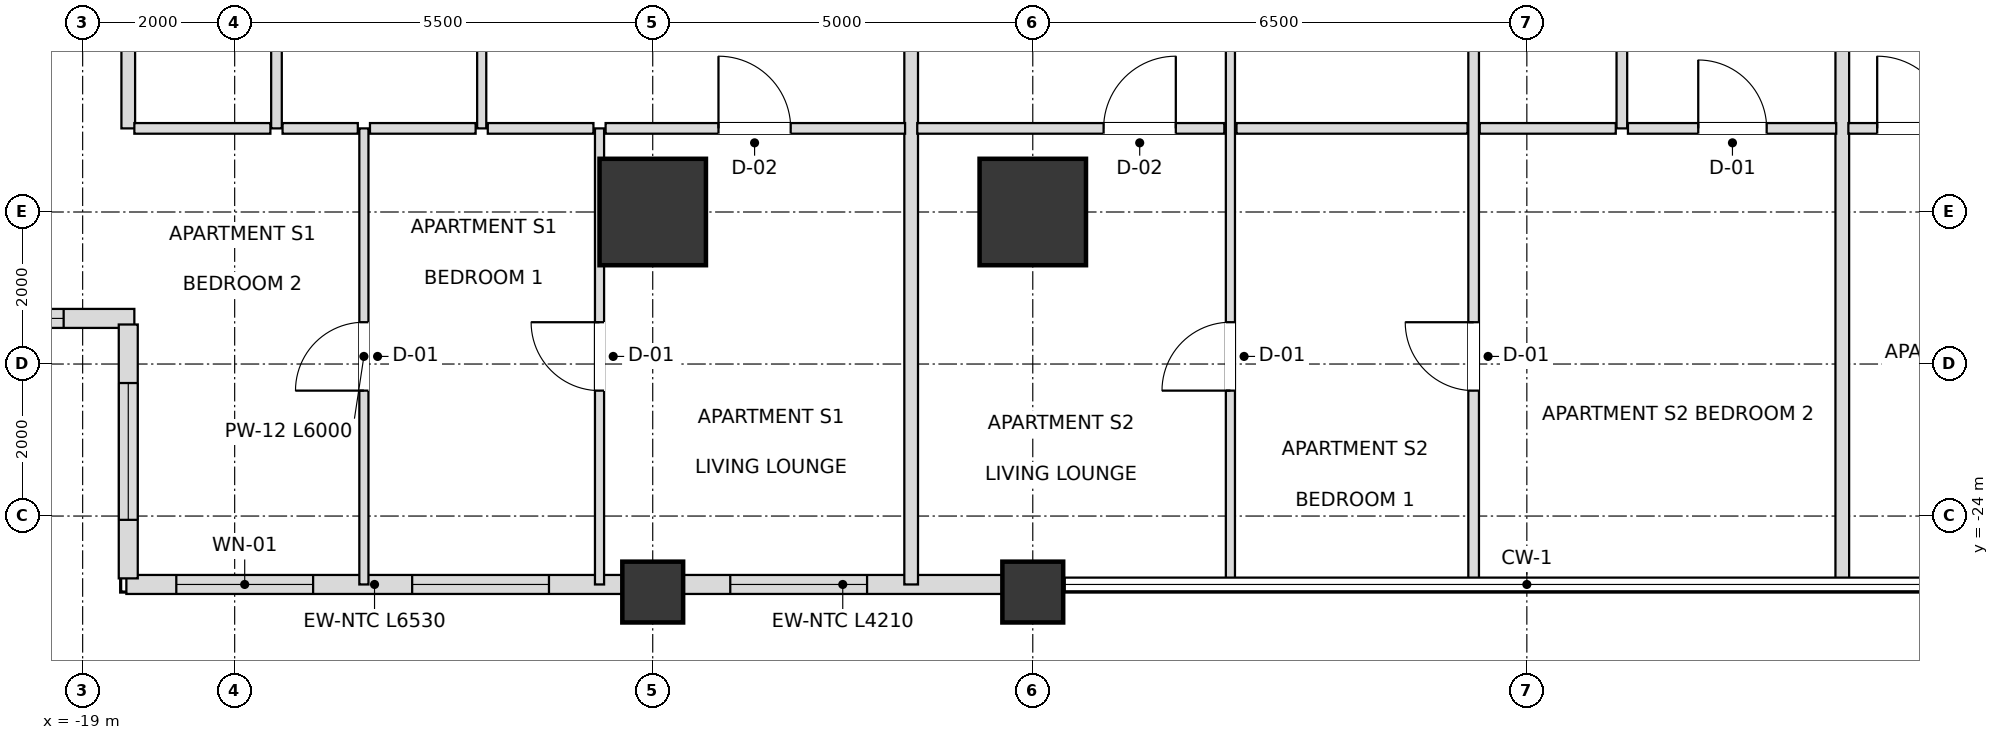
"""IFC4 building model, lengths in metres.
Left out: names, types, materials, properties, quantities, classifications, styles, units other than length and angle.
Written with IfcOpenShell. Run it as: python <this file> out.ifc"""

import sys

from ifc_helpers import new_model, si_unit, direction, frame, frame_2d, origin, origin_2d, place, context, subcontext, project, spatial, rectangle, extrude, element, fill, save


model = new_model("IFC4")
c1 = context("Model", 3, precision=1e-05, world=origin(), true_north=direction((0.0, 1.0)))
c2 = subcontext(c1, "Body", "Model", "MODEL_VIEW")
j1 = project(units=[si_unit("LENGTHUNIT", "METRE"), si_unit("PLANEANGLEUNIT", "RADIAN")], contexts=[c1])
p1 = place(None, origin())
s1 = spatial("IfcSite", under=j1, at=p1, CompositionType="ELEMENT")
p2 = place(p1, origin())
s2 = spatial("IfcBuilding", under=s1, at=p2, CompositionType="ELEMENT")
p3 = place(p2, frame((0.0, 0.0, 90.0)))
s3 = spatial("IfcBuildingStorey", under=s2, at=p3, CompositionType="ELEMENT", Elevation=90.0)
for number, where, z_axis, x_axis in (
    (1, (-11.5, -20.0, 0.0), (0.0, 0.0, 1.0), (1.0, 0.0, 0.0)),
    (2, (-6.5, -20.0, 0.0), (0.0, 0.0, 1.0), (1.0, 0.0, 0.0)),
):
    element("IfcColumn", number, at=place(p3, frame(where, z_axis=z_axis, x_axis=x_axis)), inside=s3, PredefinedType="USERDEFINED", context=c2, shape_type="SweptSolid", body=[
        extrude(rectangle(XDim=1.4, YDim=1.4, at=origin_2d()), origin(), (0.0, 0.0, 1.0), 3.6),
    ])
for number, where, z_axis, x_axis in (
    (3, (-11.5, -25.0, 0.0), (0.0, 0.0, 1.0), (1.0, 0.0, 0.0)),
    (4, (-6.5, -25.0, 0.0), (0.0, 0.0, 1.0), (1.0, 0.0, 0.0)),
):
    element("IfcColumn", number, at=place(p3, frame(where, z_axis=z_axis, x_axis=x_axis)), inside=s3, PredefinedType="COLUMN", context=c2, shape_type="SweptSolid", body=[
        extrude(rectangle(XDim=0.8, YDim=0.8, at=origin_2d()), origin(), (0.0, 0.0, 1.0), 3.6),
    ])
p4 = place(p3, frame((-18.425, -24.9, 0.0), z_axis=(0.0, 0.0, 1.0), x_axis=(1.0, 0.0, 0.0)))
e5 = element("IfcWall", 5, at=p4, inside=s3, PredefinedType="SOLIDWALL", context=c2, shape_type="SweptSolid", body=[
    extrude(rectangle(XDim=6.53, YDim=0.25, at=frame_2d((3.265, 0.0))), origin(), (0.0, 0.0, 1.0), 2.59),
])
p5 = place(p4, frame((0.657, 0.0, 0.72)))
e6 = element("IfcOpeningElement", 6, at=p5, cuts=e5, PredefinedType="OPENING", context=c2, shape_type="SweptSolid", body=[
    extrude(rectangle(XDim=1.8, YDim=1.68, at=frame_2d((0.9, 0.84))), frame((0.0, 0.135, 0.0), z_axis=(0.0, -1.0, 0.0), x_axis=(1.0, 0.0, 0.0)), (0.0, 0.0, 1.0), 0.27),
])
p6 = place(p4, frame((3.76, 0.0, 0.72)))
e7 = element("IfcOpeningElement", 7, at=p6, cuts=e5, PredefinedType="OPENING", context=c2, shape_type="SweptSolid", body=[
    extrude(rectangle(XDim=1.8, YDim=1.68, at=frame_2d((0.9, 0.84))), frame((0.0, 0.135, 0.0), z_axis=(0.0, -1.0, 0.0), x_axis=(1.0, 0.0, 0.0)), (0.0, 0.0, 1.0), 0.27),
])
p7 = place(p3, frame((-11.105, -24.9, 0.0), z_axis=(0.0, 0.0, 1.0), x_axis=(1.0, 0.0, 0.0)))
e8 = element("IfcWall", 8, at=p7, inside=s3, PredefinedType="SOLIDWALL", context=c2, shape_type="SweptSolid", body=[
    extrude(rectangle(XDim=4.21, YDim=0.25, at=frame_2d((2.105, 0.0))), origin(), (0.0, 0.0, 1.0), 2.59),
])
p8 = place(p7, frame((0.625, 0.0, 0.72)))
e9 = element("IfcOpeningElement", 9, at=p8, cuts=e8, PredefinedType="OPENING", context=c2, shape_type="SweptSolid", body=[
    extrude(rectangle(XDim=1.8, YDim=1.68, at=frame_2d((0.9, 0.84))), frame((0.0, 0.135, 0.0), z_axis=(0.0, -1.0, 0.0), x_axis=(1.0, 0.0, 0.0)), (0.0, 0.0, 1.0), 0.27),
])
p9 = place(p3, frame((-21.98, -21.4, 0.0), z_axis=(0.0, 0.0, 1.0), x_axis=(1.0, 0.0, 0.0)))
e10 = element("IfcWall", 10, at=p9, inside=s3, PredefinedType="SOLIDWALL", context=c2, shape_type="SweptSolid", body=[
    extrude(rectangle(XDim=3.66, YDim=0.25, at=frame_2d((1.83, 0.0))), origin(), (0.0, 0.0, 1.0), 2.59),
])
p10 = place(p9, frame((0.93, 0.0, 0.72)))
e11 = element("IfcOpeningElement", 11, at=p10, cuts=e10, PredefinedType="OPENING", context=c2, shape_type="SweptSolid", body=[
    extrude(rectangle(XDim=1.8, YDim=1.68, at=frame_2d((0.9, 0.84))), frame((0.0, 0.135, 0.0), z_axis=(0.0, -1.0, 0.0), x_axis=(1.0, 0.0, 0.0)), (0.0, 0.0, 1.0), 0.27),
])
p11 = place(p3, frame((-18.4, -21.48, 0.0), z_axis=(0.0, 0.0, 1.0), x_axis=(0.0, -1.0, 0.0)))
e12 = element("IfcWall", 12, at=p11, inside=s3, PredefinedType="SOLIDWALL", context=c2, shape_type="SweptSolid", body=[
    extrude(rectangle(XDim=3.34, YDim=0.25, at=frame_2d((1.67, 0.0))), origin(), (0.0, 0.0, 1.0), 2.59),
])
p12 = place(p11, frame((0.77, 0.0, 0.72)))
e13 = element("IfcOpeningElement", 13, at=p12, cuts=e12, PredefinedType="OPENING", context=c2, shape_type="SweptSolid", body=[
    extrude(rectangle(XDim=1.8, YDim=1.68, at=frame_2d((0.9, 0.84))), frame((0.0, 0.135, 0.0), z_axis=(0.0, -1.0, 0.0), x_axis=(1.0, 0.0, 0.0)), (0.0, 0.0, 1.0), 0.27),
])
p13 = place(p3, frame((-18.4, -18.9, 0.0), z_axis=(0.0, 0.0, 1.0), x_axis=(0.0, 1.0, 0.0)))
e14 = element("IfcWall", 14, at=p13, inside=s3, PredefinedType="PARTITIONING", context=c2, shape_type="SweptSolid", body=[
    extrude(rectangle(XDim=9.6, YDim=0.18, at=frame_2d((4.8, 0.0))), origin(), (0.0, 0.0, 1.0), 2.59),
])
p14 = place(p3, frame((-16.45, -18.9, 0.0), z_axis=(0.0, 0.0, 1.0), x_axis=(0.0, 1.0, 0.0)))
e15 = element("IfcWall", 15, at=p14, inside=s3, PredefinedType="PARTITIONING", context=c2, shape_type="SweptSolid", body=[
    extrude(rectangle(XDim=9.6, YDim=0.14, at=frame_2d((4.8, 0.0))), origin(), (0.0, 0.0, 1.0), 2.59),
])
p15 = place(p14, frame((4.222, 0.0, 0.0)))
e16 = element("IfcOpeningElement", 16, at=p15, cuts=e15, PredefinedType="OPENING", context=c2, shape_type="SweptSolid", body=[
    extrude(rectangle(XDim=0.9, YDim=2.1, at=frame_2d((0.45, 1.05))), frame((0.0, 0.08, 0.0), z_axis=(0.0, -1.0, 0.0), x_axis=(1.0, 0.0, 0.0)), (0.0, 0.0, 1.0), 0.16),
])
p16 = place(p3, frame((-15.3, -24.9, 0.0), z_axis=(0.0, 0.0, 1.0), x_axis=(0.0, 1.0, 0.0)))
e17 = element("IfcWall", 17, at=p16, inside=s3, PredefinedType="PARTITIONING", context=c2, shape_type="SweptSolid", body=[
    extrude(rectangle(XDim=6.0, YDim=0.12, at=frame_2d((3.0, 0.0))), origin(), (0.0, 0.0, 1.0), 2.59),
])
p17 = place(p16, frame((2.55, 0.0, 0.0)))
e18 = element("IfcOpeningElement", 18, at=p17, cuts=e17, PredefinedType="OPENING", context=c2, shape_type="SweptSolid", body=[
    extrude(rectangle(XDim=0.9, YDim=2.1, at=frame_2d((0.45, 1.05))), frame((0.0, 0.07, 0.0), z_axis=(0.0, -1.0, 0.0), x_axis=(1.0, 0.0, 0.0)), (0.0, 0.0, 1.0), 0.14),
])
p18 = place(p3, frame((-13.75, -18.9, 0.0), z_axis=(0.0, 0.0, 1.0), x_axis=(0.0, 1.0, 0.0)))
e19 = element("IfcWall", 19, at=p18, inside=s3, PredefinedType="PARTITIONING", context=c2, shape_type="SweptSolid", body=[
    extrude(rectangle(XDim=9.6, YDim=0.12, at=frame_2d((4.8, 0.0))), origin(), (0.0, 0.0, 1.0), 2.59),
])
p19 = place(p18, frame((4.325, 0.0, 0.0)))
e20 = element("IfcOpeningElement", 20, at=p19, cuts=e19, PredefinedType="OPENING", context=c2, shape_type="SweptSolid", body=[
    extrude(rectangle(XDim=0.95, YDim=2.1, at=frame_2d((0.475, 1.05))), frame((0.0, 0.07, 0.0), z_axis=(0.0, -1.0, 0.0), x_axis=(1.0, 0.0, 0.0)), (0.0, 0.0, 1.0), 0.14),
])
p20 = place(p3, frame((-12.2, -24.9, 0.0), z_axis=(0.0, 0.0, 1.0), x_axis=(0.0, 1.0, 0.0)))
e21 = element("IfcWall", 21, at=p20, inside=s3, PredefinedType="PARTITIONING", context=c2, shape_type="SweptSolid", body=[
    extrude(rectangle(XDim=6.0, YDim=0.12, at=frame_2d((3.0, 0.0))), origin(), (0.0, 0.0, 1.0), 2.59),
])
p21 = place(p20, frame((2.55, 0.0, 0.0)))
e22 = element("IfcOpeningElement", 22, at=p21, cuts=e21, PredefinedType="OPENING", context=c2, shape_type="SweptSolid", body=[
    extrude(rectangle(XDim=0.9, YDim=2.1, at=frame_2d((0.45, 1.05))), frame((0.0, 0.07, 0.0), z_axis=(0.0, -1.0, 0.0), x_axis=(1.0, 0.0, 0.0)), (0.0, 0.0, 1.0), 0.14),
])
p22 = place(p3, frame((-8.1, -24.9, 0.0), z_axis=(0.0, 0.0, 1.0), x_axis=(0.0, 1.0, 0.0)))
e23 = element("IfcWall", 23, at=p22, inside=s3, PredefinedType="PARTITIONING", context=c2, shape_type="SweptSolid", body=[
    extrude(rectangle(XDim=15.6, YDim=0.18, at=frame_2d((7.8, 0.0))), origin(), (0.0, 0.0, 1.0), 2.736),
])
p23 = place(p3, frame((-3.9, -24.9, 0.0), z_axis=(0.0, 0.0, 1.0), x_axis=(0.0, 1.0, 0.0)))
e24 = element("IfcWall", 24, at=p23, inside=s3, PredefinedType="PARTITIONING", context=c2, shape_type="SweptSolid", body=[
    extrude(rectangle(XDim=15.6, YDim=0.12, at=frame_2d((7.8, 0.0))), origin(), (0.0, 0.0, 1.0), 2.736),
])
p24 = place(p23, frame((10.325, 0.0, 0.0)))
e25 = element("IfcOpeningElement", 25, at=p24, cuts=e24, PredefinedType="OPENING", context=c2, shape_type="SweptSolid", body=[
    extrude(rectangle(XDim=0.95, YDim=2.1, at=frame_2d((0.475, 1.05))), frame((0.0, 0.07, 0.0), z_axis=(0.0, -1.0, 0.0), x_axis=(1.0, 0.0, 0.0)), (0.0, 0.0, 1.0), 0.14),
])
p25 = place(p23, frame((2.55, 0.0, 0.0)))
e26 = element("IfcOpeningElement", 26, at=p25, cuts=e24, PredefinedType="OPENING", context=c2, shape_type="SweptSolid", body=[
    extrude(rectangle(XDim=0.9, YDim=2.1, at=frame_2d((0.45, 1.05))), frame((0.0, 0.07, 0.0), z_axis=(0.0, -1.0, 0.0), x_axis=(1.0, 0.0, 0.0)), (0.0, 0.0, 1.0), 0.14),
])
p26 = place(p3, frame((-0.7, -24.9, 0.0), z_axis=(0.0, 0.0, 1.0), x_axis=(0.0, 1.0, 0.0)))
e27 = element("IfcWall", 27, at=p26, inside=s3, PredefinedType="PARTITIONING", context=c2, shape_type="SweptSolid", body=[
    extrude(rectangle(XDim=15.6, YDim=0.14, at=frame_2d((7.8, 0.0))), origin(), (0.0, 0.0, 1.0), 2.736),
])
p27 = place(p26, frame((10.35, 0.0, 0.0)))
e28 = element("IfcOpeningElement", 28, at=p27, cuts=e27, PredefinedType="OPENING", context=c2, shape_type="SweptSolid", body=[
    extrude(rectangle(XDim=0.9, YDim=2.1, at=frame_2d((0.45, 1.05))), frame((0.0, 0.08, 0.0), z_axis=(0.0, -1.0, 0.0), x_axis=(1.0, 0.0, 0.0)), (0.0, 0.0, 1.0), 0.16),
])
p28 = place(p26, frame((2.55, 0.0, 0.0)))
e29 = element("IfcOpeningElement", 29, at=p28, cuts=e27, PredefinedType="OPENING", context=c2, shape_type="SweptSolid", body=[
    extrude(rectangle(XDim=0.9, YDim=2.1, at=frame_2d((0.45, 1.05))), frame((0.0, 0.08, 0.0), z_axis=(0.0, -1.0, 0.0), x_axis=(1.0, 0.0, 0.0)), (0.0, 0.0, 1.0), 0.16),
])
p29 = place(p3, frame((1.25, -18.9, 0.0), z_axis=(0.0, 0.0, 1.0), x_axis=(0.0, 1.0, 0.0)))
e30 = element("IfcWall", 30, at=p29, inside=s3, PredefinedType="PARTITIONING", context=c2, shape_type="SweptSolid", body=[
    extrude(rectangle(XDim=9.6, YDim=0.14, at=frame_2d((4.8, 0.0))), origin(), (0.0, 0.0, 1.0), 2.868),
])
p30 = place(p3, frame((4.15, -24.9, 0.0), z_axis=(0.0, 0.0, 1.0), x_axis=(0.0, 1.0, 0.0)))
e31 = element("IfcWall", 31, at=p30, inside=s3, PredefinedType="PARTITIONING", context=c2, shape_type="SweptSolid", body=[
    extrude(rectangle(XDim=15.6, YDim=0.18, at=frame_2d((7.8, 0.0))), origin(), (0.0, 0.0, 1.0), 2.736),
])
p31 = place(p3, frame((-18.32, -18.9, 0.0), z_axis=(0.0, 0.0, 1.0), x_axis=(1.0, 0.0, 0.0)))
e32 = element("IfcWall", 32, at=p31, inside=s3, PredefinedType="PARTITIONING", context=c2, shape_type="SweptSolid", body=[
    extrude(rectangle(XDim=1.79, YDim=0.14, at=frame_2d((0.895, 0.0))), origin(), (0.0, 0.0, 1.0), 2.59),
])
p32 = place(p3, frame((-16.37, -18.9, 0.0), z_axis=(0.0, 0.0, 1.0), x_axis=(1.0, 0.0, 0.0)))
e33 = element("IfcWall", 33, at=p32, inside=s3, PredefinedType="PARTITIONING", context=c2, shape_type="SweptSolid", body=[
    extrude(rectangle(XDim=0.99, YDim=0.14, at=frame_2d((0.495, 0.0))), origin(), (0.0, 0.0, 1.0), 2.59),
])
for number, where, z_axis, x_axis in (
    (34, (-15.22, -18.9, 0.0), (0.0, 0.0, 1.0), (1.0, 0.0, 0.0)),
    (35, (-13.67, -18.9, 0.0), (0.0, 0.0, 1.0), (1.0, 0.0, 0.0)),
):
    element("IfcWall", number, at=place(p3, frame(where, z_axis=z_axis, x_axis=x_axis)), inside=s3, PredefinedType="PARTITIONING", context=c2, shape_type="SweptSolid", body=[
        extrude(rectangle(XDim=1.39, YDim=0.14, at=frame_2d((0.695, 0.0))), origin(), (0.0, 0.0, 1.0), 2.59),
    ])
p33 = place(p3, frame((-12.12, -18.9, 0.0), z_axis=(0.0, 0.0, 1.0), x_axis=(1.0, 0.0, 0.0)))
e36 = element("IfcWall", 36, at=p33, inside=s3, PredefinedType="PARTITIONING", context=c2, shape_type="SweptSolid", body=[
    extrude(rectangle(XDim=3.94, YDim=0.14, at=frame_2d((1.97, 0.0))), origin(), (0.0, 0.0, 1.0), 2.59),
])
p34 = place(p33, frame((1.485, 0.0, 0.0)))
e37 = element("IfcOpeningElement", 37, at=p34, cuts=e36, PredefinedType="OPENING", context=c2, shape_type="SweptSolid", body=[
    extrude(rectangle(XDim=0.95, YDim=2.1, at=frame_2d((0.475, 1.05))), frame((0.0, 0.08, 0.0), z_axis=(0.0, -1.0, 0.0), x_axis=(1.0, 0.0, 0.0)), (0.0, 0.0, 1.0), 0.16),
])
p35 = place(p3, frame((-8.02, -18.9, 0.0), z_axis=(0.0, 0.0, 1.0), x_axis=(1.0, 0.0, 0.0)))
e38 = element("IfcWall", 38, at=p35, inside=s3, PredefinedType="PARTITIONING", context=c2, shape_type="SweptSolid", body=[
    extrude(rectangle(XDim=4.04, YDim=0.14, at=frame_2d((2.02, 0.0))), origin(), (0.0, 0.0, 1.0), 2.736),
])
p36 = place(p35, frame((2.452, 0.0, 0.0)))
e39 = element("IfcOpeningElement", 39, at=p36, cuts=e38, PredefinedType="OPENING", context=c2, shape_type="SweptSolid", body=[
    extrude(rectangle(XDim=0.95, YDim=2.1, at=frame_2d((0.475, 1.05))), frame((0.0, 0.08, 0.0), z_axis=(0.0, -1.0, 0.0), x_axis=(1.0, 0.0, 0.0)), (0.0, 0.0, 1.0), 0.16),
])
p37 = place(p3, frame((-3.82, -18.9, 0.0), z_axis=(0.0, 0.0, 1.0), x_axis=(1.0, 0.0, 0.0)))
e40 = element("IfcWall", 40, at=p37, inside=s3, PredefinedType="PARTITIONING", context=c2, shape_type="SweptSolid", body=[
    extrude(rectangle(XDim=3.04, YDim=0.14, at=frame_2d((1.52, 0.0))), origin(), (0.0, 0.0, 1.0), 3.3),
])
p38 = place(p3, frame((-0.62, -18.9, 0.0), z_axis=(0.0, 0.0, 1.0), x_axis=(1.0, 0.0, 0.0)))
e41 = element("IfcWall", 41, at=p38, inside=s3, PredefinedType="PARTITIONING", context=c2, shape_type="SweptSolid", body=[
    extrude(rectangle(XDim=1.79, YDim=0.14, at=frame_2d((0.895, 0.0))), origin(), (0.0, 0.0, 1.0), 3.3),
])
p39 = place(p3, frame((1.33, -18.9, 0.0), z_axis=(0.0, 0.0, 1.0), x_axis=(1.0, 0.0, 0.0)))
e42 = element("IfcWall", 42, at=p39, inside=s3, PredefinedType="PARTITIONING", context=c2, shape_type="SweptSolid", body=[
    extrude(rectangle(XDim=2.74, YDim=0.14, at=frame_2d((1.37, 0.0))), origin(), (0.0, 0.0, 1.0), 3.3),
])
p40 = place(p39, frame((0.925, 0.0, 0.0)))
e43 = element("IfcOpeningElement", 43, at=p40, cuts=e42, PredefinedType="OPENING", context=c2, shape_type="SweptSolid", body=[
    extrude(rectangle(XDim=0.9, YDim=2.1, at=frame_2d((0.45, 1.05))), frame((0.0, 0.08, 0.0), z_axis=(0.0, -1.0, 0.0), x_axis=(1.0, 0.0, 0.0)), (0.0, 0.0, 1.0), 0.16),
])
p41 = place(p3, frame((4.23, -18.9, 0.0), z_axis=(0.0, 0.0, 1.0), x_axis=(1.0, 0.0, 0.0)))
e44 = element("IfcWall", 44, at=p41, inside=s3, PredefinedType="PARTITIONING", context=c2, shape_type="SweptSolid", body=[
    extrude(rectangle(XDim=4.04, YDim=0.14, at=frame_2d((2.02, 0.0))), origin(), (0.0, 0.0, 1.0), 2.736),
])
p42 = place(p41, frame((0.379, 0.0, 0.0)))
e45 = element("IfcOpeningElement", 45, at=p42, cuts=e44, PredefinedType="OPENING", context=c2, shape_type="SweptSolid", body=[
    extrude(rectangle(XDim=0.95, YDim=2.1, at=frame_2d((0.475, 1.05))), frame((0.0, 0.08, 0.0), z_axis=(0.0, -1.0, 0.0), x_axis=(1.0, 0.0, 0.0)), (0.0, 0.0, 1.0), 0.16),
])
p43 = place(p5, origin())
e46 = element("IfcWindow", 46, at=p43, inside=s3, PartitioningType="SINGLE_PANEL", PredefinedType="WINDOW", context=c2, shape_type="SweptSolid", body=[
    extrude(rectangle(XDim=1.8, YDim=1.68, at=frame_2d((0.9, 0.84))), frame((0.0, 0.03, 0.0), z_axis=(0.0, -1.0, 0.0), x_axis=(1.0, 0.0, 0.0)), (0.0, 0.0, 1.0), 0.06),
])
fill(e6, e46)
p44 = place(p6, origin())
e47 = element("IfcWindow", 47, at=p44, inside=s3, PartitioningType="SINGLE_PANEL", PredefinedType="WINDOW", context=c2, shape_type="SweptSolid", body=[
    extrude(rectangle(XDim=1.8, YDim=1.68, at=frame_2d((0.9, 0.84))), frame((0.0, 0.03, 0.0), z_axis=(0.0, -1.0, 0.0), x_axis=(1.0, 0.0, 0.0)), (0.0, 0.0, 1.0), 0.06),
])
fill(e7, e47)
p45 = place(p8, origin())
e48 = element("IfcWindow", 48, at=p45, inside=s3, PartitioningType="SINGLE_PANEL", PredefinedType="WINDOW", context=c2, shape_type="SweptSolid", body=[
    extrude(rectangle(XDim=1.8, YDim=1.68, at=frame_2d((0.9, 0.84))), frame((0.0, 0.03, 0.0), z_axis=(0.0, -1.0, 0.0), x_axis=(1.0, 0.0, 0.0)), (0.0, 0.0, 1.0), 0.06),
])
fill(e9, e48)
p46 = place(p10, origin())
e49 = element("IfcWindow", 49, at=p46, inside=s3, PartitioningType="SINGLE_PANEL", PredefinedType="WINDOW", context=c2, shape_type="SweptSolid", body=[
    extrude(rectangle(XDim=1.8, YDim=1.68, at=frame_2d((0.9, 0.84))), frame((0.0, 0.03, 0.0), z_axis=(0.0, -1.0, 0.0), x_axis=(1.0, 0.0, 0.0)), (0.0, 0.0, 1.0), 0.06),
])
fill(e11, e49)
p47 = place(p12, origin())
e50 = element("IfcWindow", 50, at=p47, inside=s3, PartitioningType="SINGLE_PANEL", PredefinedType="WINDOW", context=c2, shape_type="SweptSolid", body=[
    extrude(rectangle(XDim=1.8, YDim=1.68, at=frame_2d((0.9, 0.84))), frame((0.0, 0.03, 0.0), z_axis=(0.0, -1.0, 0.0), x_axis=(1.0, 0.0, 0.0)), (0.0, 0.0, 1.0), 0.06),
])
fill(e13, e50)
p48 = place(p34, origin())
e51 = element("IfcDoor", 51, at=p48, inside=s3, OperationType="SINGLE_SWING_LEFT", PredefinedType="DOOR", context=c2, shape_type="SweptSolid", body=[
    extrude(rectangle(XDim=0.95, YDim=2.1, at=frame_2d((0.475, 1.05))), frame((0.0, 0.025, 0.0), z_axis=(0.0, -1.0, 0.0), x_axis=(1.0, 0.0, 0.0)), (0.0, 0.0, 1.0), 0.05),
])
fill(e37, e51)
p49 = place(p21, origin())
e52 = element("IfcDoor", 52, at=p49, inside=s3, OperationType="SINGLE_SWING_RIGHT", PredefinedType="DOOR", context=c2, shape_type="SweptSolid", body=[
    extrude(rectangle(XDim=0.9, YDim=2.1, at=frame_2d((0.45, 1.05))), frame((0.0, 0.025, 0.0), z_axis=(0.0, -1.0, 0.0), x_axis=(1.0, 0.0, 0.0)), (0.0, 0.0, 1.0), 0.05),
])
fill(e22, e52)
p50 = place(p17, origin())
e53 = element("IfcDoor", 53, at=p50, inside=s3, OperationType="SINGLE_SWING_LEFT", PredefinedType="DOOR", context=c2, shape_type="SweptSolid", body=[
    extrude(rectangle(XDim=0.9, YDim=2.1, at=frame_2d((0.45, 1.05))), frame((0.0, 0.025, 0.0), z_axis=(0.0, -1.0, 0.0), x_axis=(1.0, 0.0, 0.0)), (0.0, 0.0, 1.0), 0.05),
])
fill(e18, e53)
p51 = place(p40, origin())
e54 = element("IfcDoor", 54, at=p51, inside=s3, OperationType="SINGLE_SWING_LEFT", PredefinedType="DOOR", context=c2, shape_type="SweptSolid", body=[
    extrude(rectangle(XDim=0.9, YDim=2.1, at=frame_2d((0.45, 1.05))), frame((0.0, 0.025, 0.0), z_axis=(0.0, -1.0, 0.0), x_axis=(1.0, 0.0, 0.0)), (0.0, 0.0, 1.0), 0.05),
])
fill(e43, e54)
p52 = place(p36, origin())
e55 = element("IfcDoor", 55, at=p52, inside=s3, OperationType="SINGLE_SWING_RIGHT", PredefinedType="DOOR", context=c2, shape_type="SweptSolid", body=[
    extrude(rectangle(XDim=0.95, YDim=2.1, at=frame_2d((0.475, 1.05))), frame((0.0, 0.025, 0.0), z_axis=(0.0, -1.0, 0.0), x_axis=(1.0, 0.0, 0.0)), (0.0, 0.0, 1.0), 0.05),
])
fill(e39, e55)
p53 = place(p25, origin())
e56 = element("IfcDoor", 56, at=p53, inside=s3, OperationType="SINGLE_SWING_LEFT", PredefinedType="DOOR", context=c2, shape_type="SweptSolid", body=[
    extrude(rectangle(XDim=0.9, YDim=2.1, at=frame_2d((0.45, 1.05))), frame((0.0, 0.025, 0.0), z_axis=(0.0, -1.0, 0.0), x_axis=(1.0, 0.0, 0.0)), (0.0, 0.0, 1.0), 0.05),
])
fill(e26, e56)
p54 = place(p28, origin())
e57 = element("IfcDoor", 57, at=p54, inside=s3, OperationType="SINGLE_SWING_RIGHT", PredefinedType="DOOR", context=c2, shape_type="SweptSolid", body=[
    extrude(rectangle(XDim=0.9, YDim=2.1, at=frame_2d((0.45, 1.05))), frame((0.0, 0.025, 0.0), z_axis=(0.0, -1.0, 0.0), x_axis=(1.0, 0.0, 0.0)), (0.0, 0.0, 1.0), 0.05),
])
fill(e29, e57)
p55 = place(p42, origin())
e58 = element("IfcDoor", 58, at=p55, inside=s3, OperationType="SINGLE_SWING_LEFT", PredefinedType="DOOR", context=c2, shape_type="SweptSolid", body=[
    extrude(rectangle(XDim=0.95, YDim=2.1, at=frame_2d((0.475, 1.05))), frame((0.0, 0.025, 0.0), z_axis=(0.0, -1.0, 0.0), x_axis=(1.0, 0.0, 0.0)), (0.0, 0.0, 1.0), 0.05),
])
fill(e45, e58)
save(model, sys.argv[1])
